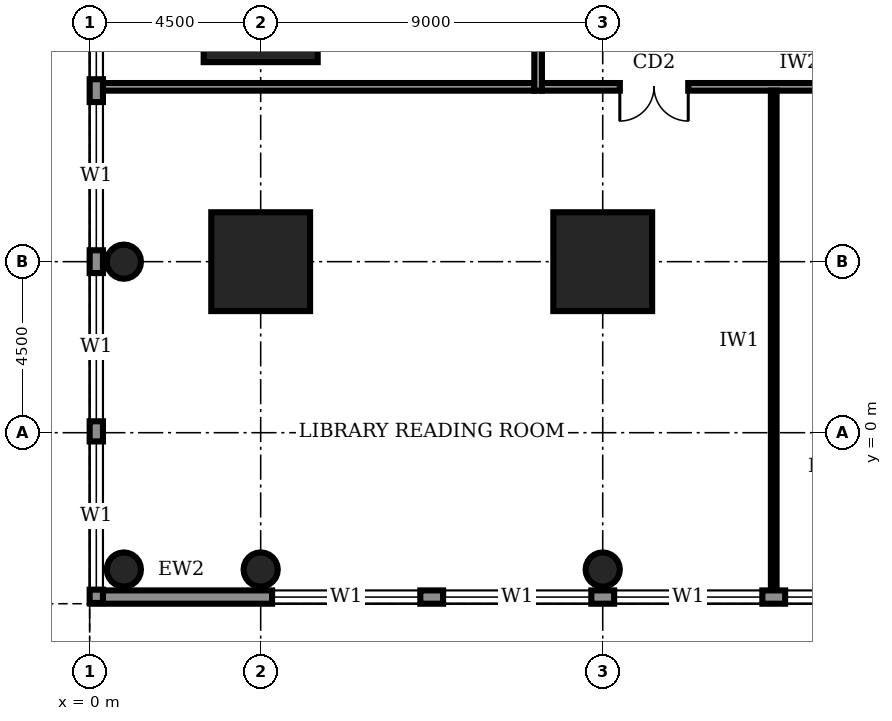
"""IFC4 building model, lengths in metres.
Left out: names, types, materials, properties, quantities, classifications, styles, units other than length and angle.
Written with IfcOpenShell. Run it as: python <this file> out.ifc"""

import sys

from ifc_helpers import new_model, si_unit, direction, frame, frame_2d, origin, origin_2d, place, context, subcontext, project, spatial, rectangle, circle, extrude, element, fill, save


model = new_model("IFC4")
c1 = context("Model", 3, precision=1e-05, world=origin(), true_north=direction((0.0, 1.0)))
c2 = subcontext(c1, "Body", "Model", "MODEL_VIEW")
j1 = project(units=[si_unit("LENGTHUNIT", "METRE"), si_unit("PLANEANGLEUNIT", "RADIAN")], contexts=[c1])
p1 = place(None, origin())
s1 = spatial("IfcSite", under=j1, at=p1, CompositionType="ELEMENT")
p2 = place(p1, origin())
s2 = spatial("IfcBuilding", under=s1, at=p2, CompositionType="ELEMENT")
p3 = place(p2, frame((0.0, 0.0, 11.0)))
s3 = spatial("IfcBuildingStorey", under=s2, at=p3, CompositionType="ELEMENT", Elevation=11.0)
for number, where, z_axis, x_axis in (
    (1, (4.5, 4.5, 0.0), (0.0, 0.0, 1.0), (1.0, 0.0, 0.0)),
    (2, (13.5, 4.5, 0.0), (0.0, 0.0, 1.0), (1.0, 0.0, 0.0)),
):
    element("IfcColumn", number, at=place(p3, frame(where, z_axis=z_axis, x_axis=x_axis)), inside=s3, PredefinedType="COLUMN", context=c2, shape_type="SweptSolid", body=[
        extrude(rectangle(XDim=2.6, YDim=2.6, at=origin_2d()), origin(), (0.0, 0.0, 1.0), 5.0),
    ])
p4 = place(p3, frame((4.5, 11.25, 0.0), z_axis=(0.0, 0.0, 1.0), x_axis=(1.0, 0.0, 0.0)))
e3 = element("IfcColumn", 3, at=p4, inside=s3, PredefinedType="COLUMN", context=c2, shape_type="SweptSolid", body=[
    extrude(rectangle(XDim=3.0, YDim=3.0, at=origin_2d()), origin(), (0.0, 0.0, 1.0), 5.0),
])
for number, where, z_axis, x_axis in (
    (4, (0.9, -3.6, 0.0), (0.0, 0.0, 1.0), (1.0, 0.0, 0.0)),
    (5, (4.5, -3.6, 0.0), (0.0, 0.0, 1.0), (1.0, 0.0, 0.0)),
    (6, (13.5, -3.6, 0.0), (0.0, 0.0, 1.0), (1.0, 0.0, 0.0)),
    (7, (0.9, 4.5, 0.0), (0.0, 0.0, 1.0), (1.0, 0.0, 0.0)),
):
    element("IfcColumn", number, at=place(p3, frame(where, z_axis=z_axis, x_axis=x_axis)), inside=s3, PredefinedType="COLUMN", context=c2, shape_type="SweptSolid", body=[
        extrude(circle(Radius=0.45, at=origin_2d()), origin(), (0.0, 0.0, 1.0), 5.0),
    ])
p5 = place(p3, frame((0.02, -4.325, 0.0), z_axis=(0.0, 0.0, 1.0), x_axis=(1.0, 0.0, 0.0)))
e8 = element("IfcWall", 8, at=p5, inside=s3, PredefinedType="STANDARD", context=c2, shape_type="SweptSolid", body=[
    extrude(rectangle(XDim=98.96, YDim=0.35, at=frame_2d((49.48, 0.0))), origin(), (0.0, 0.0, 1.0), 4.7),
])
p6 = place(p5, frame((4.78, 0.0, 0.9)))
e9 = element("IfcOpeningElement", 9, at=p6, cuts=e8, PredefinedType="OPENING", context=c2, shape_type="SweptSolid", body=[
    extrude(rectangle(XDim=3.9, YDim=2.2, at=frame_2d((1.95, 1.1))), frame((0.0, 0.185, 0.0), z_axis=(0.0, -1.0, 0.0), x_axis=(1.0, 0.0, 0.0)), (0.0, 0.0, 1.0), 0.37),
])
p7 = place(p5, frame((9.28, 0.0, 0.9)))
e10 = element("IfcOpeningElement", 10, at=p7, cuts=e8, PredefinedType="OPENING", context=c2, shape_type="SweptSolid", body=[
    extrude(rectangle(XDim=3.9, YDim=2.2, at=frame_2d((1.95, 1.1))), frame((0.0, 0.185, 0.0), z_axis=(0.0, -1.0, 0.0), x_axis=(1.0, 0.0, 0.0)), (0.0, 0.0, 1.0), 0.37),
])
p8 = place(p5, frame((13.78, 0.0, 0.9)))
e11 = element("IfcOpeningElement", 11, at=p8, cuts=e8, PredefinedType="OPENING", context=c2, shape_type="SweptSolid", body=[
    extrude(rectangle(XDim=3.9, YDim=2.2, at=frame_2d((1.95, 1.1))), frame((0.0, 0.185, 0.0), z_axis=(0.0, -1.0, 0.0), x_axis=(1.0, 0.0, 0.0)), (0.0, 0.0, 1.0), 0.37),
])
p9 = place(p5, frame((18.28, 0.0, 0.9)))
e12 = element("IfcOpeningElement", 12, at=p9, cuts=e8, PredefinedType="OPENING", context=c2, shape_type="SweptSolid", body=[
    extrude(rectangle(XDim=3.9, YDim=2.2, at=frame_2d((1.95, 1.1))), frame((0.0, 0.185, 0.0), z_axis=(0.0, -1.0, 0.0), x_axis=(1.0, 0.0, 0.0)), (0.0, 0.0, 1.0), 0.37),
])
p10 = place(p5, frame((22.78, 0.0, 0.9)))
e13 = element("IfcOpeningElement", 13, at=p10, cuts=e8, PredefinedType="OPENING", context=c2, shape_type="SweptSolid", body=[
    extrude(rectangle(XDim=3.9, YDim=2.2, at=frame_2d((1.95, 1.1))), frame((0.0, 0.185, 0.0), z_axis=(0.0, -1.0, 0.0), x_axis=(1.0, 0.0, 0.0)), (0.0, 0.0, 1.0), 0.37),
])
p11 = place(p5, frame((27.28, 0.0, 0.9)))
e14 = element("IfcOpeningElement", 14, at=p11, cuts=e8, PredefinedType="OPENING", context=c2, shape_type="SweptSolid", body=[
    extrude(rectangle(XDim=3.9, YDim=2.2, at=frame_2d((1.95, 1.1))), frame((0.0, 0.185, 0.0), z_axis=(0.0, -1.0, 0.0), x_axis=(1.0, 0.0, 0.0)), (0.0, 0.0, 1.0), 0.37),
])
p12 = place(p5, frame((31.78, 0.0, 0.9)))
e15 = element("IfcOpeningElement", 15, at=p12, cuts=e8, PredefinedType="OPENING", context=c2, shape_type="SweptSolid", body=[
    extrude(rectangle(XDim=3.9, YDim=2.2, at=frame_2d((1.95, 1.1))), frame((0.0, 0.185, 0.0), z_axis=(0.0, -1.0, 0.0), x_axis=(1.0, 0.0, 0.0)), (0.0, 0.0, 1.0), 0.37),
])
p13 = place(p5, frame((36.28, 0.0, 0.9)))
e16 = element("IfcOpeningElement", 16, at=p13, cuts=e8, PredefinedType="OPENING", context=c2, shape_type="SweptSolid", body=[
    extrude(rectangle(XDim=3.9, YDim=2.2, at=frame_2d((1.95, 1.1))), frame((0.0, 0.185, 0.0), z_axis=(0.0, -1.0, 0.0), x_axis=(1.0, 0.0, 0.0)), (0.0, 0.0, 1.0), 0.37),
])
p14 = place(p5, frame((40.78, 0.0, 0.9)))
e17 = element("IfcOpeningElement", 17, at=p14, cuts=e8, PredefinedType="OPENING", context=c2, shape_type="SweptSolid", body=[
    extrude(rectangle(XDim=3.9, YDim=2.2, at=frame_2d((1.95, 1.1))), frame((0.0, 0.185, 0.0), z_axis=(0.0, -1.0, 0.0), x_axis=(1.0, 0.0, 0.0)), (0.0, 0.0, 1.0), 0.37),
])
p15 = place(p5, frame((45.28, 0.0, 0.9)))
e18 = element("IfcOpeningElement", 18, at=p15, cuts=e8, PredefinedType="OPENING", context=c2, shape_type="SweptSolid", body=[
    extrude(rectangle(XDim=3.9, YDim=2.2, at=frame_2d((1.95, 1.1))), frame((0.0, 0.185, 0.0), z_axis=(0.0, -1.0, 0.0), x_axis=(1.0, 0.0, 0.0)), (0.0, 0.0, 1.0), 0.37),
])
p16 = place(p5, frame((49.78, 0.0, 0.9)))
e19 = element("IfcOpeningElement", 19, at=p16, cuts=e8, PredefinedType="OPENING", context=c2, shape_type="SweptSolid", body=[
    extrude(rectangle(XDim=3.9, YDim=2.2, at=frame_2d((1.95, 1.1))), frame((0.0, 0.185, 0.0), z_axis=(0.0, -1.0, 0.0), x_axis=(1.0, 0.0, 0.0)), (0.0, 0.0, 1.0), 0.37),
])
p17 = place(p5, frame((54.28, 0.0, 0.9)))
e20 = element("IfcOpeningElement", 20, at=p17, cuts=e8, PredefinedType="OPENING", context=c2, shape_type="SweptSolid", body=[
    extrude(rectangle(XDim=3.9, YDim=2.2, at=frame_2d((1.95, 1.1))), frame((0.0, 0.185, 0.0), z_axis=(0.0, -1.0, 0.0), x_axis=(1.0, 0.0, 0.0)), (0.0, 0.0, 1.0), 0.37),
])
p18 = place(p5, frame((58.78, 0.0, 0.9)))
e21 = element("IfcOpeningElement", 21, at=p18, cuts=e8, PredefinedType="OPENING", context=c2, shape_type="SweptSolid", body=[
    extrude(rectangle(XDim=3.9, YDim=2.2, at=frame_2d((1.95, 1.1))), frame((0.0, 0.185, 0.0), z_axis=(0.0, -1.0, 0.0), x_axis=(1.0, 0.0, 0.0)), (0.0, 0.0, 1.0), 0.37),
])
p19 = place(p5, frame((63.28, 0.0, 0.9)))
e22 = element("IfcOpeningElement", 22, at=p19, cuts=e8, PredefinedType="OPENING", context=c2, shape_type="SweptSolid", body=[
    extrude(rectangle(XDim=3.9, YDim=2.2, at=frame_2d((1.95, 1.1))), frame((0.0, 0.185, 0.0), z_axis=(0.0, -1.0, 0.0), x_axis=(1.0, 0.0, 0.0)), (0.0, 0.0, 1.0), 0.37),
])
p20 = place(p5, frame((67.78, 0.0, 0.9)))
e23 = element("IfcOpeningElement", 23, at=p20, cuts=e8, PredefinedType="OPENING", context=c2, shape_type="SweptSolid", body=[
    extrude(rectangle(XDim=3.9, YDim=2.2, at=frame_2d((1.95, 1.1))), frame((0.0, 0.185, 0.0), z_axis=(0.0, -1.0, 0.0), x_axis=(1.0, 0.0, 0.0)), (0.0, 0.0, 1.0), 0.37),
])
p21 = place(p5, frame((72.28, 0.0, 0.9)))
e24 = element("IfcOpeningElement", 24, at=p21, cuts=e8, PredefinedType="OPENING", context=c2, shape_type="SweptSolid", body=[
    extrude(rectangle(XDim=3.9, YDim=2.2, at=frame_2d((1.95, 1.1))), frame((0.0, 0.185, 0.0), z_axis=(0.0, -1.0, 0.0), x_axis=(1.0, 0.0, 0.0)), (0.0, 0.0, 1.0), 0.37),
])
p22 = place(p5, frame((76.78, 0.0, 0.9)))
e25 = element("IfcOpeningElement", 25, at=p22, cuts=e8, PredefinedType="OPENING", context=c2, shape_type="SweptSolid", body=[
    extrude(rectangle(XDim=3.9, YDim=2.2, at=frame_2d((1.95, 1.1))), frame((0.0, 0.185, 0.0), z_axis=(0.0, -1.0, 0.0), x_axis=(1.0, 0.0, 0.0)), (0.0, 0.0, 1.0), 0.37),
])
p23 = place(p5, frame((81.28, 0.0, 0.9)))
e26 = element("IfcOpeningElement", 26, at=p23, cuts=e8, PredefinedType="OPENING", context=c2, shape_type="SweptSolid", body=[
    extrude(rectangle(XDim=3.9, YDim=2.2, at=frame_2d((1.95, 1.1))), frame((0.0, 0.185, 0.0), z_axis=(0.0, -1.0, 0.0), x_axis=(1.0, 0.0, 0.0)), (0.0, 0.0, 1.0), 0.37),
])
p24 = place(p5, frame((85.78, 0.0, 0.9)))
e27 = element("IfcOpeningElement", 27, at=p24, cuts=e8, PredefinedType="OPENING", context=c2, shape_type="SweptSolid", body=[
    extrude(rectangle(XDim=3.9, YDim=2.2, at=frame_2d((1.95, 1.1))), frame((0.0, 0.185, 0.0), z_axis=(0.0, -1.0, 0.0), x_axis=(1.0, 0.0, 0.0)), (0.0, 0.0, 1.0), 0.37),
])
p25 = place(p5, frame((90.28, 0.0, 0.9)))
e28 = element("IfcOpeningElement", 28, at=p25, cuts=e8, PredefinedType="OPENING", context=c2, shape_type="SweptSolid", body=[
    extrude(rectangle(XDim=3.9, YDim=2.2, at=frame_2d((1.95, 1.1))), frame((0.0, 0.185, 0.0), z_axis=(0.0, -1.0, 0.0), x_axis=(1.0, 0.0, 0.0)), (0.0, 0.0, 1.0), 0.37),
])
p26 = place(p5, frame((94.71, 0.0, 0.9)))
e29 = element("IfcOpeningElement", 29, at=p26, cuts=e8, PredefinedType="OPENING", context=c2, shape_type="SweptSolid", body=[
    extrude(rectangle(XDim=3.9, YDim=2.2, at=frame_2d((1.95, 1.1))), frame((0.0, 0.185, 0.0), z_axis=(0.0, -1.0, 0.0), x_axis=(1.0, 0.0, 0.0)), (0.0, 0.0, 1.0), 0.37),
])
p27 = place(p3, frame((0.175, 49.48, 0.0), z_axis=(0.0, 0.0, 1.0), x_axis=(0.0, -1.0, 0.0)))
e30 = element("IfcWall", 30, at=p27, inside=s3, PredefinedType="STANDARD", context=c2, shape_type="SweptSolid", body=[
    extrude(rectangle(XDim=53.96, YDim=0.35, at=frame_2d((26.98, 0.0))), origin(), (0.0, 0.0, 1.0), 4.7),
])
p28 = place(p27, frame((49.71, 0.0, 0.9)))
e31 = element("IfcOpeningElement", 31, at=p28, cuts=e30, PredefinedType="OPENING", context=c2, shape_type="SweptSolid", body=[
    extrude(rectangle(XDim=3.9, YDim=2.2, at=frame_2d((1.95, 1.1))), frame((0.0, 0.185, 0.0), z_axis=(0.0, -1.0, 0.0), x_axis=(1.0, 0.0, 0.0)), (0.0, 0.0, 1.0), 0.37),
])
p29 = place(p27, frame((45.28, 0.0, 0.9)))
e32 = element("IfcOpeningElement", 32, at=p29, cuts=e30, PredefinedType="OPENING", context=c2, shape_type="SweptSolid", body=[
    extrude(rectangle(XDim=3.9, YDim=2.2, at=frame_2d((1.95, 1.1))), frame((0.0, 0.185, 0.0), z_axis=(0.0, -1.0, 0.0), x_axis=(1.0, 0.0, 0.0)), (0.0, 0.0, 1.0), 0.37),
])
p30 = place(p27, frame((40.78, 0.0, 0.9)))
e33 = element("IfcOpeningElement", 33, at=p30, cuts=e30, PredefinedType="OPENING", context=c2, shape_type="SweptSolid", body=[
    extrude(rectangle(XDim=3.9, YDim=2.2, at=frame_2d((1.95, 1.1))), frame((0.0, 0.185, 0.0), z_axis=(0.0, -1.0, 0.0), x_axis=(1.0, 0.0, 0.0)), (0.0, 0.0, 1.0), 0.37),
])
p31 = place(p27, frame((36.28, 0.0, 0.9)))
e34 = element("IfcOpeningElement", 34, at=p31, cuts=e30, PredefinedType="OPENING", context=c2, shape_type="SweptSolid", body=[
    extrude(rectangle(XDim=3.9, YDim=2.2, at=frame_2d((1.95, 1.1))), frame((0.0, 0.185, 0.0), z_axis=(0.0, -1.0, 0.0), x_axis=(1.0, 0.0, 0.0)), (0.0, 0.0, 1.0), 0.37),
])
p32 = place(p27, frame((31.78, 0.0, 0.9)))
e35 = element("IfcOpeningElement", 35, at=p32, cuts=e30, PredefinedType="OPENING", context=c2, shape_type="SweptSolid", body=[
    extrude(rectangle(XDim=3.9, YDim=2.2, at=frame_2d((1.95, 1.1))), frame((0.0, 0.185, 0.0), z_axis=(0.0, -1.0, 0.0), x_axis=(1.0, 0.0, 0.0)), (0.0, 0.0, 1.0), 0.37),
])
p33 = place(p27, frame((27.28, 0.0, 0.9)))
e36 = element("IfcOpeningElement", 36, at=p33, cuts=e30, PredefinedType="OPENING", context=c2, shape_type="SweptSolid", body=[
    extrude(rectangle(XDim=3.9, YDim=2.2, at=frame_2d((1.95, 1.1))), frame((0.0, 0.185, 0.0), z_axis=(0.0, -1.0, 0.0), x_axis=(1.0, 0.0, 0.0)), (0.0, 0.0, 1.0), 0.37),
])
p34 = place(p27, frame((22.78, 0.0, 0.9)))
e37 = element("IfcOpeningElement", 37, at=p34, cuts=e30, PredefinedType="OPENING", context=c2, shape_type="SweptSolid", body=[
    extrude(rectangle(XDim=3.9, YDim=2.2, at=frame_2d((1.95, 1.1))), frame((0.0, 0.185, 0.0), z_axis=(0.0, -1.0, 0.0), x_axis=(1.0, 0.0, 0.0)), (0.0, 0.0, 1.0), 0.37),
])
p35 = place(p27, frame((18.28, 0.0, 0.9)))
e38 = element("IfcOpeningElement", 38, at=p35, cuts=e30, PredefinedType="OPENING", context=c2, shape_type="SweptSolid", body=[
    extrude(rectangle(XDim=3.9, YDim=2.2, at=frame_2d((1.95, 1.1))), frame((0.0, 0.185, 0.0), z_axis=(0.0, -1.0, 0.0), x_axis=(1.0, 0.0, 0.0)), (0.0, 0.0, 1.0), 0.37),
])
p36 = place(p27, frame((13.78, 0.0, 0.9)))
e39 = element("IfcOpeningElement", 39, at=p36, cuts=e30, PredefinedType="OPENING", context=c2, shape_type="SweptSolid", body=[
    extrude(rectangle(XDim=3.9, YDim=2.2, at=frame_2d((1.95, 1.1))), frame((0.0, 0.185, 0.0), z_axis=(0.0, -1.0, 0.0), x_axis=(1.0, 0.0, 0.0)), (0.0, 0.0, 1.0), 0.37),
])
p37 = place(p27, frame((9.28, 0.0, 0.9)))
e40 = element("IfcOpeningElement", 40, at=p37, cuts=e30, PredefinedType="OPENING", context=c2, shape_type="SweptSolid", body=[
    extrude(rectangle(XDim=3.9, YDim=2.2, at=frame_2d((1.95, 1.1))), frame((0.0, 0.185, 0.0), z_axis=(0.0, -1.0, 0.0), x_axis=(1.0, 0.0, 0.0)), (0.0, 0.0, 1.0), 0.37),
])
p38 = place(p27, frame((4.78, 0.0, 0.9)))
e41 = element("IfcOpeningElement", 41, at=p38, cuts=e30, PredefinedType="OPENING", context=c2, shape_type="SweptSolid", body=[
    extrude(rectangle(XDim=3.9, YDim=2.2, at=frame_2d((1.95, 1.1))), frame((0.0, 0.185, 0.0), z_axis=(0.0, -1.0, 0.0), x_axis=(1.0, 0.0, 0.0)), (0.0, 0.0, 1.0), 0.37),
])
p39 = place(p3, frame((11.9, 9.1, 0.0), z_axis=(0.0, 0.0, 1.0), x_axis=(1.0, 0.0, 0.0)))
e42 = element("IfcWall", 42, at=p39, inside=s3, PredefinedType="SOLIDWALL", context=c2, shape_type="SweptSolid", body=[
    extrude(rectangle(XDim=16.9, YDim=0.2, at=frame_2d((8.45, 0.0))), origin(), (0.0, 0.0, 1.0), 4.7),
])
p40 = place(p39, frame((2.05, 0.0, 0.0)))
e43 = element("IfcOpeningElement", 43, at=p40, cuts=e42, PredefinedType="OPENING", context=c2, shape_type="SweptSolid", body=[
    extrude(rectangle(XDim=1.8, YDim=2.1, at=frame_2d((0.9, 1.05))), frame((0.0, 0.11, 0.0), z_axis=(0.0, -1.0, 0.0), x_axis=(1.0, 0.0, 0.0)), (0.0, 0.0, 1.0), 0.22),
])
p41 = place(p39, frame((9.7, 0.0, 0.0)))
e44 = element("IfcOpeningElement", 44, at=p41, cuts=e42, PredefinedType="OPENING", context=c2, shape_type="SweptSolid", body=[
    extrude(rectangle(XDim=1.8, YDim=2.1, at=frame_2d((0.9, 1.05))), frame((0.0, 0.11, 0.0), z_axis=(0.0, -1.0, 0.0), x_axis=(1.0, 0.0, 0.0)), (0.0, 0.0, 1.0), 0.22),
])
p42 = place(p39, frame((15.425, 0.0, 0.0)))
e45 = element("IfcOpeningElement", 45, at=p42, cuts=e42, PredefinedType="OPENING", context=c2, shape_type="SweptSolid", body=[
    extrude(rectangle(XDim=1.0, YDim=2.1, at=frame_2d((0.5, 1.05))), frame((0.0, 0.11, 0.0), z_axis=(0.0, -1.0, 0.0), x_axis=(1.0, 0.0, 0.0)), (0.0, 0.0, 1.0), 0.22),
])
p43 = place(p3, frame((11.8, 31.3, 0.0), z_axis=(0.0, 0.0, 1.0), x_axis=(0.0, -1.0, 0.0)))
e46 = element("IfcWall", 46, at=p43, inside=s3, PredefinedType="SOLIDWALL", context=c2, shape_type="SweptSolid", body=[
    extrude(rectangle(XDim=22.3, YDim=0.2, at=frame_2d((11.15, 0.0))), origin(), (0.0, 0.0, 1.0), 4.7),
])
p44 = place(p43, frame((19.55, 0.0, 0.0)))
e47 = element("IfcOpeningElement", 47, at=p44, cuts=e46, PredefinedType="OPENING", context=c2, shape_type="SweptSolid", body=[
    extrude(rectangle(XDim=1.0, YDim=2.1, at=frame_2d((0.5, 1.05))), frame((0.0, 0.11, 0.0), z_axis=(0.0, -1.0, 0.0), x_axis=(1.0, 0.0, 0.0)), (0.0, 0.0, 1.0), 0.22),
])
p45 = place(p43, frame((15.45, 0.0, 0.0)))
e48 = element("IfcOpeningElement", 48, at=p45, cuts=e46, PredefinedType="OPENING", context=c2, shape_type="SweptSolid", body=[
    extrude(rectangle(XDim=0.9, YDim=2.1, at=frame_2d((0.45, 1.05))), frame((0.0, 0.11, 0.0), z_axis=(0.0, -1.0, 0.0), x_axis=(1.0, 0.0, 0.0)), (0.0, 0.0, 1.0), 0.22),
])
p46 = place(p43, frame((12.45, 0.0, 0.0)))
e49 = element("IfcOpeningElement", 49, at=p46, cuts=e46, PredefinedType="OPENING", context=c2, shape_type="SweptSolid", body=[
    extrude(rectangle(XDim=0.9, YDim=2.1, at=frame_2d((0.45, 1.05))), frame((0.0, 0.11, 0.0), z_axis=(0.0, -1.0, 0.0), x_axis=(1.0, 0.0, 0.0)), (0.0, 0.0, 1.0), 0.22),
])
p47 = place(p43, frame((7.6, 0.0, 0.0)))
e50 = element("IfcOpeningElement", 50, at=p47, cuts=e46, PredefinedType="OPENING", context=c2, shape_type="SweptSolid", body=[
    extrude(rectangle(XDim=0.9, YDim=2.1, at=frame_2d((0.45, 1.05))), frame((0.0, 0.11, 0.0), z_axis=(0.0, -1.0, 0.0), x_axis=(1.0, 0.0, 0.0)), (0.0, 0.0, 1.0), 0.22),
])
p48 = place(p43, frame((4.8, 0.0, 0.0)))
e51 = element("IfcOpeningElement", 51, at=p48, cuts=e46, PredefinedType="OPENING", context=c2, shape_type="SweptSolid", body=[
    extrude(rectangle(XDim=1.0, YDim=2.1, at=frame_2d((0.5, 1.05))), frame((0.0, 0.11, 0.0), z_axis=(0.0, -1.0, 0.0), x_axis=(1.0, 0.0, 0.0)), (0.0, 0.0, 1.0), 0.22),
])
p49 = place(p43, frame((10.3, 0.0, 0.0)))
e52 = element("IfcOpeningElement", 52, at=p49, cuts=e46, PredefinedType="OPENING", context=c2, shape_type="SweptSolid", body=[
    extrude(rectangle(XDim=1.0, YDim=2.1, at=frame_2d((0.5, 1.05))), frame((0.0, 0.11, 0.0), z_axis=(0.0, -1.0, 0.0), x_axis=(1.0, 0.0, 0.0)), (0.0, 0.0, 1.0), 0.22),
])
p50 = place(p43, frame((1.55, 0.0, 0.0)))
e53 = element("IfcOpeningElement", 53, at=p50, cuts=e46, PredefinedType="OPENING", context=c2, shape_type="SweptSolid", body=[
    extrude(rectangle(XDim=1.0, YDim=2.1, at=frame_2d((0.5, 1.05))), frame((0.0, 0.11, 0.0), z_axis=(0.0, -1.0, 0.0), x_axis=(1.0, 0.0, 0.0)), (0.0, 0.0, 1.0), 0.22),
])
p51 = place(p3, frame((0.3, 9.1, 0.0), z_axis=(0.0, 0.0, 1.0), x_axis=(1.0, 0.0, 0.0)))
e54 = element("IfcWall", 54, at=p51, inside=s3, PredefinedType="SOLIDWALL", context=c2, shape_type="SweptSolid", body=[
    extrude(rectangle(XDim=11.4, YDim=0.2, at=frame_2d((5.7, 0.0))), origin(), (0.0, 0.0, 1.0), 4.7),
])
p52 = place(p3, frame((18.0, -4.2, 0.0), z_axis=(0.0, 0.0, 1.0), x_axis=(0.0, 1.0, 0.0)))
e55 = element("IfcWall", 55, at=p52, inside=s3, PredefinedType="PARTITIONING", context=c2, shape_type="SweptSolid", body=[
    extrude(rectangle(XDim=13.2, YDim=0.15, at=frame_2d((6.6, 0.0))), origin(), (0.0, 0.0, 1.0), 4.7),
])
p53 = place(p6, origin())
e56 = element("IfcWindow", 56, at=p53, inside=s3, PartitioningType="SINGLE_PANEL", PredefinedType="WINDOW", context=c2, shape_type="SweptSolid", body=[
    extrude(rectangle(XDim=3.9, YDim=2.2, at=frame_2d((1.95, 1.1))), frame((0.0, 0.03, 0.0), z_axis=(0.0, -1.0, 0.0), x_axis=(1.0, 0.0, 0.0)), (0.0, 0.0, 1.0), 0.06),
])
fill(e9, e56)
p54 = place(p7, origin())
e57 = element("IfcWindow", 57, at=p54, inside=s3, PartitioningType="SINGLE_PANEL", PredefinedType="WINDOW", context=c2, shape_type="SweptSolid", body=[
    extrude(rectangle(XDim=3.9, YDim=2.2, at=frame_2d((1.95, 1.1))), frame((0.0, 0.03, 0.0), z_axis=(0.0, -1.0, 0.0), x_axis=(1.0, 0.0, 0.0)), (0.0, 0.0, 1.0), 0.06),
])
fill(e10, e57)
p55 = place(p8, origin())
e58 = element("IfcWindow", 58, at=p55, inside=s3, PartitioningType="SINGLE_PANEL", PredefinedType="WINDOW", context=c2, shape_type="SweptSolid", body=[
    extrude(rectangle(XDim=3.9, YDim=2.2, at=frame_2d((1.95, 1.1))), frame((0.0, 0.03, 0.0), z_axis=(0.0, -1.0, 0.0), x_axis=(1.0, 0.0, 0.0)), (0.0, 0.0, 1.0), 0.06),
])
fill(e11, e58)
p56 = place(p9, origin())
e59 = element("IfcWindow", 59, at=p56, inside=s3, PartitioningType="SINGLE_PANEL", PredefinedType="WINDOW", context=c2, shape_type="SweptSolid", body=[
    extrude(rectangle(XDim=3.9, YDim=2.2, at=frame_2d((1.95, 1.1))), frame((0.0, 0.03, 0.0), z_axis=(0.0, -1.0, 0.0), x_axis=(1.0, 0.0, 0.0)), (0.0, 0.0, 1.0), 0.06),
])
fill(e12, e59)
p57 = place(p28, origin())
e60 = element("IfcWindow", 60, at=p57, inside=s3, PartitioningType="SINGLE_PANEL", PredefinedType="WINDOW", context=c2, shape_type="SweptSolid", body=[
    extrude(rectangle(XDim=3.9, YDim=2.2, at=frame_2d((1.95, 1.1))), frame((0.0, 0.03, 0.0), z_axis=(0.0, -1.0, 0.0), x_axis=(1.0, 0.0, 0.0)), (0.0, 0.0, 1.0), 0.06),
])
fill(e31, e60)
p58 = place(p29, origin())
e61 = element("IfcWindow", 61, at=p58, inside=s3, PartitioningType="SINGLE_PANEL", PredefinedType="WINDOW", context=c2, shape_type="SweptSolid", body=[
    extrude(rectangle(XDim=3.9, YDim=2.2, at=frame_2d((1.95, 1.1))), frame((0.0, 0.03, 0.0), z_axis=(0.0, -1.0, 0.0), x_axis=(1.0, 0.0, 0.0)), (0.0, 0.0, 1.0), 0.06),
])
fill(e32, e61)
p59 = place(p30, origin())
e62 = element("IfcWindow", 62, at=p59, inside=s3, PartitioningType="SINGLE_PANEL", PredefinedType="WINDOW", context=c2, shape_type="SweptSolid", body=[
    extrude(rectangle(XDim=3.9, YDim=2.2, at=frame_2d((1.95, 1.1))), frame((0.0, 0.03, 0.0), z_axis=(0.0, -1.0, 0.0), x_axis=(1.0, 0.0, 0.0)), (0.0, 0.0, 1.0), 0.06),
])
fill(e33, e62)
p60 = place(p31, origin())
e63 = element("IfcWindow", 63, at=p60, inside=s3, PartitioningType="SINGLE_PANEL", PredefinedType="WINDOW", context=c2, shape_type="SweptSolid", body=[
    extrude(rectangle(XDim=3.9, YDim=2.2, at=frame_2d((1.95, 1.1))), frame((0.0, 0.03, 0.0), z_axis=(0.0, -1.0, 0.0), x_axis=(1.0, 0.0, 0.0)), (0.0, 0.0, 1.0), 0.06),
])
fill(e34, e63)
p61 = place(p40, frame((1.8, 0.0, 0.0), z_axis=(0.0, 0.0, 1.0), x_axis=(-1.0, 0.0, 0.0)))
e64 = element("IfcDoor", 64, at=p61, inside=s3, OperationType="DOUBLE_DOOR_SINGLE_SWING", PredefinedType="DOOR", context=c2, shape_type="SweptSolid", body=[
    extrude(rectangle(XDim=1.8, YDim=2.1, at=frame_2d((0.9, 1.05))), frame((0.0, 0.025, 0.0), z_axis=(0.0, -1.0, 0.0), x_axis=(1.0, 0.0, 0.0)), (0.0, 0.0, 1.0), 0.05),
])
fill(e43, e64)
save(model, sys.argv[1])
